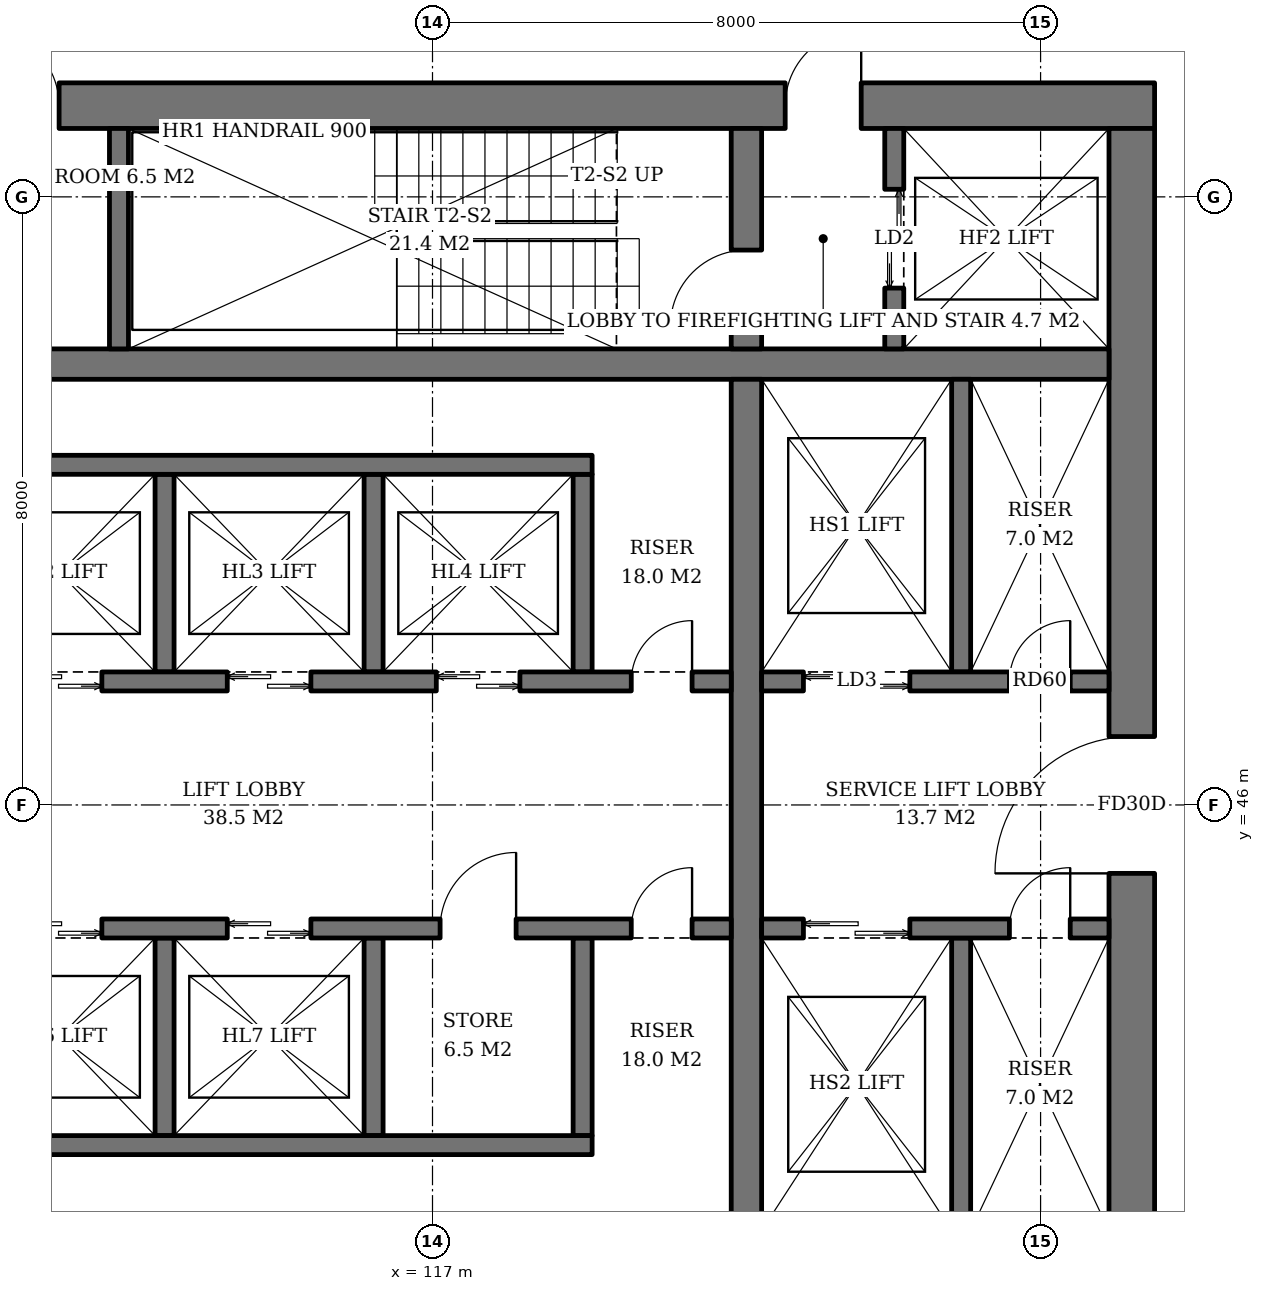
"""IFC4 building model, lengths in metres.
Left out: names, types, materials, properties, quantities, classifications, styles, units other than length and angle.
Written with IfcOpenShell. Run it as: python <this file> out.ifc"""

import sys

from ifc_helpers import new_model, si_unit, direction, frame, frame_2d, origin, place, context, subcontext, project, spatial, rectangle, extrude, element, fill, save


model = new_model("IFC4")
c1 = context("Model", 3, precision=1e-05, world=origin(), true_north=direction((0.0, 1.0)))
c2 = subcontext(c1, "Body", "Model", "MODEL_VIEW")
j1 = project(units=[si_unit("LENGTHUNIT", "METRE"), si_unit("PLANEANGLEUNIT", "RADIAN")], contexts=[c1])
p1 = place(None, origin())
s1 = spatial("IfcSite", under=j1, at=p1, CompositionType="ELEMENT")
p2 = place(p1, origin())
s2 = spatial("IfcBuilding", under=s1, at=p2, CompositionType="ELEMENT")
p3 = place(p2, frame((0.0, 0.0, 108.4)))
s3 = spatial("IfcBuildingStorey", under=s2, at=p3, CompositionType="ELEMENT", Elevation=108.4)
p4 = place(p3, frame((107.5, 55.2, 0.0), z_axis=(0.0, 0.0, 1.0), x_axis=(1.0, 0.0, 0.0)))
e1 = element("IfcWall", 1, at=p4, inside=s3, PredefinedType="SHEAR", context=c2, shape_type="SweptSolid", body=[
    extrude(rectangle(XDim=19.0, YDim=0.6, at=frame_2d((9.5, 0.0))), origin(), (0.0, 0.0, 1.0), 3.8),
])
p5 = place(p4, frame((14.14, 0.0, 0.0)))
e2 = element("IfcOpeningElement", 2, at=p5, cuts=e1, PredefinedType="OPENING", context=c2, shape_type="SweptSolid", body=[
    extrude(rectangle(XDim=1.0, YDim=2.1, at=frame_2d((0.5, 1.05))), frame((0.0, 0.31, 0.0), z_axis=(0.0, -1.0, 0.0), x_axis=(1.0, 0.0, 0.0)), (0.0, 0.0, 1.0), 0.62),
])
p6 = place(p4, frame((1.675, 0.0, 0.0)))
e3 = element("IfcOpeningElement", 3, at=p6, cuts=e1, PredefinedType="OPENING", context=c2, shape_type="SweptSolid", body=[
    extrude(rectangle(XDim=1.0, YDim=2.1, at=frame_2d((0.5, 1.05))), frame((0.0, 0.31, 0.0), z_axis=(0.0, -1.0, 0.0), x_axis=(1.0, 0.0, 0.0)), (0.0, 0.0, 1.0), 0.62),
])
p7 = place(p4, frame((3.587, 0.0, 0.0)))
e4 = element("IfcOpeningElement", 4, at=p7, cuts=e1, PredefinedType="OPENING", context=c2, shape_type="SweptSolid", body=[
    extrude(rectangle(XDim=1.0, YDim=2.1, at=frame_2d((0.5, 1.05))), frame((0.0, 0.31, 0.0), z_axis=(0.0, -1.0, 0.0), x_axis=(1.0, 0.0, 0.0)), (0.0, 0.0, 1.0), 0.62),
])
p8 = place(p3, frame((126.2, 37.1, 0.0), z_axis=(0.0, 0.0, 1.0), x_axis=(0.0, 1.0, 0.0)))
e5 = element("IfcWall", 5, at=p8, inside=s3, PredefinedType="SHEAR", context=c2, shape_type="SweptSolid", body=[
    extrude(rectangle(XDim=17.8, YDim=0.6, at=frame_2d((8.9, 0.0))), origin(), (0.0, 0.0, 1.0), 3.8),
])
p9 = place(p8, frame((8.0, 0.0, 0.0)))
e6 = element("IfcOpeningElement", 6, at=p9, cuts=e5, PredefinedType="OPENING", context=c2, shape_type="SweptSolid", body=[
    extrude(rectangle(XDim=1.8, YDim=2.4, at=frame_2d((0.9, 1.2))), frame((0.0, 0.31, 0.0), z_axis=(0.0, -1.0, 0.0), x_axis=(1.0, 0.0, 0.0)), (0.0, 0.0, 1.0), 0.62),
])
p10 = place(p3, frame((108.1, 51.8, 0.0), z_axis=(0.0, 0.0, 1.0), x_axis=(1.0, 0.0, 0.0)))
e7 = element("IfcWall", 7, at=p10, inside=s3, PredefinedType="SHEAR", context=c2, shape_type="SweptSolid", body=[
    extrude(rectangle(XDim=17.8, YDim=0.4, at=frame_2d((8.9, 0.0))), origin(), (0.0, 0.0, 1.0), 3.8),
])
p11 = place(p3, frame((121.13, 40.4, 0.0), z_axis=(0.0, 0.0, 1.0), x_axis=(0.0, 1.0, 0.0)))
e8 = element("IfcWall", 8, at=p11, inside=s3, PredefinedType="SHEAR", context=c2, shape_type="SweptSolid", body=[
    extrude(rectangle(XDim=11.2, YDim=0.4, at=frame_2d((5.6, 0.0))), origin(), (0.0, 0.0, 1.0), 3.8),
])
p12 = place(p3, frame((121.13, 52.0, 0.0), z_axis=(0.0, 0.0, 1.0), x_axis=(0.0, 1.0, 0.0)))
e9 = element("IfcWall", 9, at=p12, inside=s3, PredefinedType="SHEAR", context=c2, shape_type="SweptSolid", body=[
    extrude(rectangle(XDim=2.9, YDim=0.4, at=frame_2d((1.45, 0.0))), origin(), (0.0, 0.0, 1.0), 3.8),
])
p13 = place(p12, frame((0.3, 0.0, 0.0)))
e10 = element("IfcOpeningElement", 10, at=p13, cuts=e9, PredefinedType="OPENING", context=c2, shape_type="SweptSolid", body=[
    extrude(rectangle(XDim=1.0, YDim=2.1, at=frame_2d((0.5, 1.05))), frame((0.0, 0.21, 0.0), z_axis=(0.0, -1.0, 0.0), x_axis=(1.0, 0.0, 0.0)), (0.0, 0.0, 1.0), 0.42),
])
p14 = place(p3, frame((112.875, 52.0, 0.0), z_axis=(0.0, 0.0, 1.0), x_axis=(0.0, 1.0, 0.0)))
e11 = element("IfcWall", 11, at=p14, inside=s3, PredefinedType="SHEAR", context=c2, shape_type="SweptSolid", body=[
    extrude(rectangle(XDim=2.9, YDim=0.25, at=frame_2d((1.45, 0.0))), origin(), (0.0, 0.0, 1.0), 3.8),
])
p15 = place(p3, frame((123.075, 52.0, 0.0), z_axis=(0.0, 0.0, 1.0), x_axis=(0.0, 1.0, 0.0)))
e12 = element("IfcWall", 12, at=p15, inside=s3, PredefinedType="SHEAR", context=c2, shape_type="SweptSolid", body=[
    extrude(rectangle(XDim=2.9, YDim=0.25, at=frame_2d((1.45, 0.0))), origin(), (0.0, 0.0, 1.0), 3.8),
])
p16 = place(p15, frame((0.8, 0.0, 0.0)))
e13 = element("IfcOpeningElement", 13, at=p16, cuts=e12, PredefinedType="OPENING", context=c2, shape_type="SweptSolid", body=[
    extrude(rectangle(XDim=1.3, YDim=2.2, at=frame_2d((0.65, 1.1))), frame((0.0, 0.135, 0.0), z_axis=(0.0, -1.0, 0.0), x_axis=(1.0, 0.0, 0.0)), (0.0, 0.0, 1.0), 0.27),
])
for number, where, z_axis, x_axis in (
    (14, (113.475, 47.75, 0.0), (0.0, 0.0, 1.0), (0.0, 1.0, 0.0)),
    (15, (116.225, 47.75, 0.0), (0.0, 0.0, 1.0), (0.0, 1.0, 0.0)),
    (16, (118.975, 47.75, 0.0), (0.0, 0.0, 1.0), (0.0, 1.0, 0.0)),
):
    element("IfcWall", number, at=place(p3, frame(where, z_axis=z_axis, x_axis=x_axis)), inside=s3, PredefinedType="SHEAR", context=c2, shape_type="SweptSolid", body=[
        extrude(rectangle(XDim=2.6, YDim=0.25, at=frame_2d((1.3, 0.0))), origin(), (0.0, 0.0, 1.0), 3.8),
    ])
p17 = place(p3, frame((108.1, 50.475, 0.0), z_axis=(0.0, 0.0, 1.0), x_axis=(1.0, 0.0, 0.0)))
e17 = element("IfcWall", 17, at=p17, inside=s3, PredefinedType="SHEAR", context=c2, shape_type="SweptSolid", body=[
    extrude(rectangle(XDim=11.0, YDim=0.25, at=frame_2d((5.5, 0.0))), origin(), (0.0, 0.0, 1.0), 3.8),
])
p18 = place(p3, frame((108.1, 47.625, 0.0), z_axis=(0.0, 0.0, 1.0), x_axis=(1.0, 0.0, 0.0)))
e18 = element("IfcWall", 18, at=p18, inside=s3, PredefinedType="SHEAR", context=c2, shape_type="SweptSolid", body=[
    extrude(rectangle(XDim=12.83, YDim=0.25, at=frame_2d((6.415, 0.0))), origin(), (0.0, 0.0, 1.0), 3.8),
])
p19 = place(p18, frame((0.7, 0.0, 0.0)))
e19 = element("IfcOpeningElement", 19, at=p19, cuts=e18, PredefinedType="OPENING", context=c2, shape_type="SweptSolid", body=[
    extrude(rectangle(XDim=1.1, YDim=2.2, at=frame_2d((0.55, 1.1))), frame((0.0, 0.135, 0.0), z_axis=(0.0, -1.0, 0.0), x_axis=(1.0, 0.0, 0.0)), (0.0, 0.0, 1.0), 0.27),
])
p20 = place(p18, frame((3.45, 0.0, 0.0)))
e20 = element("IfcOpeningElement", 20, at=p20, cuts=e18, PredefinedType="OPENING", context=c2, shape_type="SweptSolid", body=[
    extrude(rectangle(XDim=1.1, YDim=2.2, at=frame_2d((0.55, 1.1))), frame((0.0, 0.135, 0.0), z_axis=(0.0, -1.0, 0.0), x_axis=(1.0, 0.0, 0.0)), (0.0, 0.0, 1.0), 0.27),
])
p21 = place(p18, frame((6.2, 0.0, 0.0)))
e21 = element("IfcOpeningElement", 21, at=p21, cuts=e18, PredefinedType="OPENING", context=c2, shape_type="SweptSolid", body=[
    extrude(rectangle(XDim=1.1, YDim=2.2, at=frame_2d((0.55, 1.1))), frame((0.0, 0.135, 0.0), z_axis=(0.0, -1.0, 0.0), x_axis=(1.0, 0.0, 0.0)), (0.0, 0.0, 1.0), 0.27),
])
p22 = place(p18, frame((8.95, 0.0, 0.0)))
e22 = element("IfcOpeningElement", 22, at=p22, cuts=e18, PredefinedType="OPENING", context=c2, shape_type="SweptSolid", body=[
    extrude(rectangle(XDim=1.1, YDim=2.2, at=frame_2d((0.55, 1.1))), frame((0.0, 0.135, 0.0), z_axis=(0.0, -1.0, 0.0), x_axis=(1.0, 0.0, 0.0)), (0.0, 0.0, 1.0), 0.27),
])
p23 = place(p18, frame((11.515, 0.0, 0.0)))
e23 = element("IfcOpeningElement", 23, at=p23, cuts=e18, PredefinedType="OPENING", context=c2, shape_type="SweptSolid", body=[
    extrude(rectangle(XDim=0.8, YDim=2.0, at=frame_2d((0.4, 1.0))), frame((0.0, 0.135, 0.0), z_axis=(0.0, -1.0, 0.0), x_axis=(1.0, 0.0, 0.0)), (0.0, 0.0, 1.0), 0.27),
])
for number, where, z_axis, x_axis in (
    (24, (113.475, 44.25, 0.0), (0.0, 0.0, 1.0), (0.0, -1.0, 0.0)),
    (25, (116.225, 44.25, 0.0), (0.0, 0.0, 1.0), (0.0, -1.0, 0.0)),
    (26, (118.975, 44.25, 0.0), (0.0, 0.0, 1.0), (0.0, -1.0, 0.0)),
):
    element("IfcWall", number, at=place(p3, frame(where, z_axis=z_axis, x_axis=x_axis)), inside=s3, PredefinedType="SHEAR", context=c2, shape_type="SweptSolid", body=[
        extrude(rectangle(XDim=2.6, YDim=0.25, at=frame_2d((1.3, 0.0))), origin(), (0.0, 0.0, 1.0), 3.8),
    ])
p24 = place(p3, frame((108.1, 41.525, 0.0), z_axis=(0.0, 0.0, 1.0), x_axis=(1.0, 0.0, 0.0)))
e27 = element("IfcWall", 27, at=p24, inside=s3, PredefinedType="SHEAR", context=c2, shape_type="SweptSolid", body=[
    extrude(rectangle(XDim=11.0, YDim=0.25, at=frame_2d((5.5, 0.0))), origin(), (0.0, 0.0, 1.0), 3.8),
])
p25 = place(p3, frame((108.1, 44.375, 0.0), z_axis=(0.0, 0.0, 1.0), x_axis=(1.0, 0.0, 0.0)))
e28 = element("IfcWall", 28, at=p25, inside=s3, PredefinedType="SHEAR", context=c2, shape_type="SweptSolid", body=[
    extrude(rectangle(XDim=12.83, YDim=0.25, at=frame_2d((6.415, 0.0))), origin(), (0.0, 0.0, 1.0), 3.8),
])
p26 = place(p25, frame((0.7, 0.0, 0.0)))
e29 = element("IfcOpeningElement", 29, at=p26, cuts=e28, PredefinedType="OPENING", context=c2, shape_type="SweptSolid", body=[
    extrude(rectangle(XDim=1.1, YDim=2.2, at=frame_2d((0.55, 1.1))), frame((0.0, 0.135, 0.0), z_axis=(0.0, -1.0, 0.0), x_axis=(1.0, 0.0, 0.0)), (0.0, 0.0, 1.0), 0.27),
])
p27 = place(p25, frame((3.45, 0.0, 0.0)))
e30 = element("IfcOpeningElement", 30, at=p27, cuts=e28, PredefinedType="OPENING", context=c2, shape_type="SweptSolid", body=[
    extrude(rectangle(XDim=1.1, YDim=2.2, at=frame_2d((0.55, 1.1))), frame((0.0, 0.135, 0.0), z_axis=(0.0, -1.0, 0.0), x_axis=(1.0, 0.0, 0.0)), (0.0, 0.0, 1.0), 0.27),
])
p28 = place(p25, frame((6.2, 0.0, 0.0)))
e31 = element("IfcOpeningElement", 31, at=p28, cuts=e28, PredefinedType="OPENING", context=c2, shape_type="SweptSolid", body=[
    extrude(rectangle(XDim=1.1, YDim=2.2, at=frame_2d((0.55, 1.1))), frame((0.0, 0.135, 0.0), z_axis=(0.0, -1.0, 0.0), x_axis=(1.0, 0.0, 0.0)), (0.0, 0.0, 1.0), 0.27),
])
p29 = place(p25, frame((9.0, 0.0, 0.0)))
e32 = element("IfcOpeningElement", 32, at=p29, cuts=e28, PredefinedType="OPENING", context=c2, shape_type="SweptSolid", body=[
    extrude(rectangle(XDim=1.0, YDim=2.1, at=frame_2d((0.5, 1.05))), frame((0.0, 0.135, 0.0), z_axis=(0.0, -1.0, 0.0), x_axis=(1.0, 0.0, 0.0)), (0.0, 0.0, 1.0), 0.27),
])
p30 = place(p25, frame((11.515, 0.0, 0.0)))
e33 = element("IfcOpeningElement", 33, at=p30, cuts=e28, PredefinedType="OPENING", context=c2, shape_type="SweptSolid", body=[
    extrude(rectangle(XDim=0.8, YDim=2.0, at=frame_2d((0.4, 1.0))), frame((0.0, 0.135, 0.0), z_axis=(0.0, -1.0, 0.0), x_axis=(1.0, 0.0, 0.0)), (0.0, 0.0, 1.0), 0.27),
])
p31 = place(p3, frame((123.955, 47.75, 0.0), z_axis=(0.0, 0.0, 1.0), x_axis=(0.0, 1.0, 0.0)))
e34 = element("IfcWall", 34, at=p31, inside=s3, PredefinedType="SHEAR", context=c2, shape_type="SweptSolid", body=[
    extrude(rectangle(XDim=3.85, YDim=0.25, at=frame_2d((1.925, 0.0))), origin(), (0.0, 0.0, 1.0), 3.8),
])
p32 = place(p3, frame((121.33, 47.625, 0.0), z_axis=(0.0, 0.0, 1.0), x_axis=(1.0, 0.0, 0.0)))
e35 = element("IfcWall", 35, at=p32, inside=s3, PredefinedType="SHEAR", context=c2, shape_type="SweptSolid", body=[
    extrude(rectangle(XDim=4.57, YDim=0.25, at=frame_2d((2.285, 0.0))), origin(), (0.0, 0.0, 1.0), 3.8),
])
p33 = place(p32, frame((0.55, 0.0, 0.0)))
e36 = element("IfcOpeningElement", 36, at=p33, cuts=e35, PredefinedType="OPENING", context=c2, shape_type="SweptSolid", body=[
    extrude(rectangle(XDim=1.4, YDim=2.4, at=frame_2d((0.7, 1.2))), frame((0.0, 0.135, 0.0), z_axis=(0.0, -1.0, 0.0), x_axis=(1.0, 0.0, 0.0)), (0.0, 0.0, 1.0), 0.27),
])
p34 = place(p32, frame((3.26, 0.0, 0.0)))
e37 = element("IfcOpeningElement", 37, at=p34, cuts=e35, PredefinedType="OPENING", context=c2, shape_type="SweptSolid", body=[
    extrude(rectangle(XDim=0.8, YDim=2.0, at=frame_2d((0.4, 1.0))), frame((0.0, 0.135, 0.0), z_axis=(0.0, -1.0, 0.0), x_axis=(1.0, 0.0, 0.0)), (0.0, 0.0, 1.0), 0.27),
])
p35 = place(p3, frame((123.955, 44.25, 0.0), z_axis=(0.0, 0.0, 1.0), x_axis=(0.0, -1.0, 0.0)))
e38 = element("IfcWall", 38, at=p35, inside=s3, PredefinedType="SHEAR", context=c2, shape_type="SweptSolid", body=[
    extrude(rectangle(XDim=3.85, YDim=0.25, at=frame_2d((1.925, 0.0))), origin(), (0.0, 0.0, 1.0), 3.8),
])
p36 = place(p3, frame((121.33, 44.375, 0.0), z_axis=(0.0, 0.0, 1.0), x_axis=(1.0, 0.0, 0.0)))
e39 = element("IfcWall", 39, at=p36, inside=s3, PredefinedType="SHEAR", context=c2, shape_type="SweptSolid", body=[
    extrude(rectangle(XDim=4.57, YDim=0.25, at=frame_2d((2.285, 0.0))), origin(), (0.0, 0.0, 1.0), 3.8),
])
p37 = place(p36, frame((0.55, 0.0, 0.0)))
e40 = element("IfcOpeningElement", 40, at=p37, cuts=e39, PredefinedType="OPENING", context=c2, shape_type="SweptSolid", body=[
    extrude(rectangle(XDim=1.4, YDim=2.4, at=frame_2d((0.7, 1.2))), frame((0.0, 0.135, 0.0), z_axis=(0.0, -1.0, 0.0), x_axis=(1.0, 0.0, 0.0)), (0.0, 0.0, 1.0), 0.27),
])
p38 = place(p36, frame((3.26, 0.0, 0.0)))
e41 = element("IfcOpeningElement", 41, at=p38, cuts=e39, PredefinedType="OPENING", context=c2, shape_type="SweptSolid", body=[
    extrude(rectangle(XDim=0.8, YDim=2.0, at=frame_2d((0.4, 1.0))), frame((0.0, 0.135, 0.0), z_axis=(0.0, -1.0, 0.0), x_axis=(1.0, 0.0, 0.0)), (0.0, 0.0, 1.0), 0.27),
])
p39 = place(p16, origin())
e42 = element("IfcDoor", 42, at=p39, inside=s3, OperationType="DOUBLE_DOOR_SLIDING", PredefinedType="DOOR", context=c2, shape_type="SweptSolid", body=[
    extrude(rectangle(XDim=1.3, YDim=2.2, at=frame_2d((0.65, 1.1))), frame((0.0, 0.025, 0.0), z_axis=(0.0, -1.0, 0.0), x_axis=(1.0, 0.0, 0.0)), (0.0, 0.0, 1.0), 0.05),
])
fill(e13, e42)
p40 = place(p20, origin())
e43 = element("IfcDoor", 43, at=p40, inside=s3, OperationType="DOUBLE_DOOR_SLIDING", PredefinedType="DOOR", context=c2, shape_type="SweptSolid", body=[
    extrude(rectangle(XDim=1.1, YDim=2.2, at=frame_2d((0.55, 1.1))), frame((0.0, 0.025, 0.0), z_axis=(0.0, -1.0, 0.0), x_axis=(1.0, 0.0, 0.0)), (0.0, 0.0, 1.0), 0.05),
])
fill(e20, e43)
p41 = place(p21, origin())
e44 = element("IfcDoor", 44, at=p41, inside=s3, OperationType="DOUBLE_DOOR_SLIDING", PredefinedType="DOOR", context=c2, shape_type="SweptSolid", body=[
    extrude(rectangle(XDim=1.1, YDim=2.2, at=frame_2d((0.55, 1.1))), frame((0.0, 0.025, 0.0), z_axis=(0.0, -1.0, 0.0), x_axis=(1.0, 0.0, 0.0)), (0.0, 0.0, 1.0), 0.05),
])
fill(e21, e44)
p42 = place(p22, origin())
e45 = element("IfcDoor", 45, at=p42, inside=s3, OperationType="DOUBLE_DOOR_SLIDING", PredefinedType="DOOR", context=c2, shape_type="SweptSolid", body=[
    extrude(rectangle(XDim=1.1, YDim=2.2, at=frame_2d((0.55, 1.1))), frame((0.0, 0.025, 0.0), z_axis=(0.0, -1.0, 0.0), x_axis=(1.0, 0.0, 0.0)), (0.0, 0.0, 1.0), 0.05),
])
fill(e22, e45)
p43 = place(p23, origin())
e46 = element("IfcDoor", 46, at=p43, inside=s3, OperationType="SINGLE_SWING_RIGHT", PredefinedType="DOOR", context=c2, shape_type="SweptSolid", body=[
    extrude(rectangle(XDim=0.8, YDim=2.0, at=frame_2d((0.4, 1.0))), frame((0.0, 0.025, 0.0), z_axis=(0.0, -1.0, 0.0), x_axis=(1.0, 0.0, 0.0)), (0.0, 0.0, 1.0), 0.05),
])
fill(e23, e46)
p44 = place(p27, origin())
e47 = element("IfcDoor", 47, at=p44, inside=s3, OperationType="DOUBLE_DOOR_SLIDING", PredefinedType="DOOR", context=c2, shape_type="SweptSolid", body=[
    extrude(rectangle(XDim=1.1, YDim=2.2, at=frame_2d((0.55, 1.1))), frame((0.0, 0.025, 0.0), z_axis=(0.0, -1.0, 0.0), x_axis=(1.0, 0.0, 0.0)), (0.0, 0.0, 1.0), 0.05),
])
fill(e30, e47)
p45 = place(p28, origin())
e48 = element("IfcDoor", 48, at=p45, inside=s3, OperationType="DOUBLE_DOOR_SLIDING", PredefinedType="DOOR", context=c2, shape_type="SweptSolid", body=[
    extrude(rectangle(XDim=1.1, YDim=2.2, at=frame_2d((0.55, 1.1))), frame((0.0, 0.025, 0.0), z_axis=(0.0, -1.0, 0.0), x_axis=(1.0, 0.0, 0.0)), (0.0, 0.0, 1.0), 0.05),
])
fill(e31, e48)
p46 = place(p29, origin())
e49 = element("IfcDoor", 49, at=p46, inside=s3, OperationType="SINGLE_SWING_RIGHT", PredefinedType="DOOR", context=c2, shape_type="SweptSolid", body=[
    extrude(rectangle(XDim=1.0, YDim=2.1, at=frame_2d((0.5, 1.05))), frame((0.0, 0.025, 0.0), z_axis=(0.0, -1.0, 0.0), x_axis=(1.0, 0.0, 0.0)), (0.0, 0.0, 1.0), 0.05),
])
fill(e32, e49)
p47 = place(p30, origin())
e50 = element("IfcDoor", 50, at=p47, inside=s3, OperationType="SINGLE_SWING_RIGHT", PredefinedType="DOOR", context=c2, shape_type="SweptSolid", body=[
    extrude(rectangle(XDim=0.8, YDim=2.0, at=frame_2d((0.4, 1.0))), frame((0.0, 0.025, 0.0), z_axis=(0.0, -1.0, 0.0), x_axis=(1.0, 0.0, 0.0)), (0.0, 0.0, 1.0), 0.05),
])
fill(e33, e50)
p48 = place(p33, origin())
e51 = element("IfcDoor", 51, at=p48, inside=s3, OperationType="DOUBLE_DOOR_SLIDING", PredefinedType="DOOR", context=c2, shape_type="SweptSolid", body=[
    extrude(rectangle(XDim=1.4, YDim=2.4, at=frame_2d((0.7, 1.2))), frame((0.0, 0.025, 0.0), z_axis=(0.0, -1.0, 0.0), x_axis=(1.0, 0.0, 0.0)), (0.0, 0.0, 1.0), 0.05),
])
fill(e36, e51)
p49 = place(p34, origin())
e52 = element("IfcDoor", 52, at=p49, inside=s3, OperationType="SINGLE_SWING_RIGHT", PredefinedType="DOOR", context=c2, shape_type="SweptSolid", body=[
    extrude(rectangle(XDim=0.8, YDim=2.0, at=frame_2d((0.4, 1.0))), frame((0.0, 0.025, 0.0), z_axis=(0.0, -1.0, 0.0), x_axis=(1.0, 0.0, 0.0)), (0.0, 0.0, 1.0), 0.05),
])
fill(e37, e52)
p50 = place(p37, origin())
e53 = element("IfcDoor", 53, at=p50, inside=s3, OperationType="DOUBLE_DOOR_SLIDING", PredefinedType="DOOR", context=c2, shape_type="SweptSolid", body=[
    extrude(rectangle(XDim=1.4, YDim=2.4, at=frame_2d((0.7, 1.2))), frame((0.0, 0.025, 0.0), z_axis=(0.0, -1.0, 0.0), x_axis=(1.0, 0.0, 0.0)), (0.0, 0.0, 1.0), 0.05),
])
fill(e40, e53)
p51 = place(p38, origin())
e54 = element("IfcDoor", 54, at=p51, inside=s3, OperationType="SINGLE_SWING_RIGHT", PredefinedType="DOOR", context=c2, shape_type="SweptSolid", body=[
    extrude(rectangle(XDim=0.8, YDim=2.0, at=frame_2d((0.4, 1.0))), frame((0.0, 0.025, 0.0), z_axis=(0.0, -1.0, 0.0), x_axis=(1.0, 0.0, 0.0)), (0.0, 0.0, 1.0), 0.05),
])
fill(e41, e54)
p52 = place(p13, origin())
e55 = element("IfcDoor", 55, at=p52, inside=s3, OperationType="SINGLE_SWING_LEFT", PredefinedType="DOOR", context=c2, shape_type="SweptSolid", body=[
    extrude(rectangle(XDim=1.0, YDim=2.1, at=frame_2d((0.5, 1.05))), frame((0.0, 0.025, 0.0), z_axis=(0.0, -1.0, 0.0), x_axis=(1.0, 0.0, 0.0)), (0.0, 0.0, 1.0), 0.05),
])
fill(e10, e55)
p53 = place(p5, origin())
e56 = element("IfcDoor", 56, at=p53, inside=s3, OperationType="SINGLE_SWING_RIGHT", PredefinedType="DOOR", context=c2, shape_type="SweptSolid", body=[
    extrude(rectangle(XDim=1.0, YDim=2.1, at=frame_2d((0.5, 1.05))), frame((0.0, 0.025, 0.0), z_axis=(0.0, -1.0, 0.0), x_axis=(1.0, 0.0, 0.0)), (0.0, 0.0, 1.0), 0.05),
])
fill(e2, e56)
p54 = place(p9, origin())
e57 = element("IfcDoor", 57, at=p54, inside=s3, OperationType="DOUBLE_DOOR_SINGLE_SWING", PredefinedType="DOOR", context=c2, shape_type="SweptSolid", body=[
    extrude(rectangle(XDim=1.8, YDim=2.4, at=frame_2d((0.9, 1.2))), frame((0.0, 0.025, 0.0), z_axis=(0.0, -1.0, 0.0), x_axis=(1.0, 0.0, 0.0)), (0.0, 0.0, 1.0), 0.05),
])
fill(e6, e57)
p55 = place(p7, origin())
e58 = element("IfcDoor", 58, at=p55, inside=s3, OperationType="SINGLE_SWING_LEFT", PredefinedType="DOOR", context=c2, shape_type="SweptSolid", body=[
    extrude(rectangle(XDim=1.0, YDim=2.1, at=frame_2d((0.5, 1.05))), frame((0.0, -0.24, 0.0), z_axis=(0.0, -1.0, 0.0), x_axis=(1.0, 0.0, 0.0)), (0.0, 0.0, 1.0), 0.05),
])
fill(e4, e58)
save(model, sys.argv[1])
